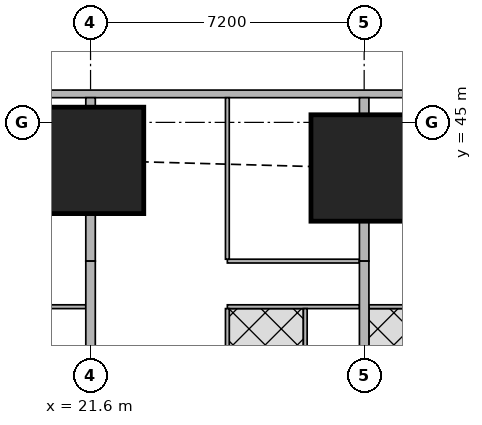
"""IFC4 building model, lengths in metres.
Left out: names, types, materials, properties, quantities, classifications, styles, units other than length and angle.
Written with IfcOpenShell. Run it as: python <this file> out.ifc"""

import sys

from ifc_helpers import new_model, si_unit, direction, frame, frame_2d, origin, origin_2d, place, context, subcontext, project, spatial, rectangle, extrude, element, fill, save


model = new_model("IFC4")
c1 = context("Model", 3, precision=1e-05, world=origin(), true_north=direction((0.0, 1.0)))
c2 = subcontext(c1, "Body", "Model", "MODEL_VIEW")
j1 = project(units=[si_unit("LENGTHUNIT", "METRE"), si_unit("PLANEANGLEUNIT", "RADIAN")], contexts=[c1])
p1 = place(None, origin())
s1 = spatial("IfcSite", under=j1, at=p1, CompositionType="ELEMENT")
p2 = place(p1, origin())
s2 = spatial("IfcBuilding", under=s1, at=p2, CompositionType="ELEMENT")
p3 = place(p2, frame((0.0, 0.0, 42.5)))
s3 = spatial("IfcBuildingStorey", under=s2, at=p3, CompositionType="ELEMENT", Elevation=42.5)
for number, where, z_axis, x_axis in (
    (1, (21.6, 44.0, 0.0), (0.0, 0.0, 1.0), (1.0, 0.0, 0.0)),
    (2, (28.8, 43.8, 0.0), (0.0, 0.0, 1.0), (1.0, 0.0, 0.0)),
):
    element("IfcColumn", number, at=place(p3, frame(where, z_axis=z_axis, x_axis=x_axis)), inside=s3, PredefinedType="COLUMN", context=c2, shape_type="SweptSolid", body=[
        extrude(rectangle(XDim=2.8, YDim=2.8, at=origin_2d()), origin(), (0.0, 0.0, 1.0), 3.75),
    ])
p4 = place(p3, frame((40.106, 45.75, 0.0), z_axis=(0.0, 0.0, 1.0), x_axis=(-1.0, 0.0, 0.0)))
e3 = element("IfcWall", 3, at=p4, inside=s3, PredefinedType="SOLIDWALL", context=c2, shape_type="SweptSolid", body=[
    extrude(rectangle(XDim=37.943, YDim=0.2, at=frame_2d((18.971, 0.0))), origin(), (0.0, 0.0, 1.0), 3.5),
])
p5 = place(p4, frame((8.606, 0.0, 0.9)))
e4 = element("IfcOpeningElement", 4, at=p5, cuts=e3, PredefinedType="OPENING", context=c2, shape_type="SweptSolid", body=[
    extrude(rectangle(XDim=1.8, YDim=1.5, at=frame_2d((0.9, 0.75))), frame((0.0, 0.11, 0.0), z_axis=(0.0, -1.0, 0.0), x_axis=(1.0, 0.0, 0.0)), (0.0, 0.0, 1.0), 0.22),
])
p6 = place(p4, frame((12.206, 0.0, 0.9)))
e5 = element("IfcOpeningElement", 5, at=p6, cuts=e3, PredefinedType="OPENING", context=c2, shape_type="SweptSolid", body=[
    extrude(rectangle(XDim=1.8, YDim=1.5, at=frame_2d((0.9, 0.75))), frame((0.0, 0.11, 0.0), z_axis=(0.0, -1.0, 0.0), x_axis=(1.0, 0.0, 0.0)), (0.0, 0.0, 1.0), 0.22),
])
p7 = place(p4, frame((15.806, 0.0, 0.9)))
e6 = element("IfcOpeningElement", 6, at=p7, cuts=e3, PredefinedType="OPENING", context=c2, shape_type="SweptSolid", body=[
    extrude(rectangle(XDim=1.8, YDim=1.5, at=frame_2d((0.9, 0.75))), frame((0.0, 0.11, 0.0), z_axis=(0.0, -1.0, 0.0), x_axis=(1.0, 0.0, 0.0)), (0.0, 0.0, 1.0), 0.22),
])
p8 = place(p4, frame((19.406, 0.0, 0.9)))
e7 = element("IfcOpeningElement", 7, at=p8, cuts=e3, PredefinedType="OPENING", context=c2, shape_type="SweptSolid", body=[
    extrude(rectangle(XDim=1.8, YDim=1.5, at=frame_2d((0.9, 0.75))), frame((0.0, 0.11, 0.0), z_axis=(0.0, -1.0, 0.0), x_axis=(1.0, 0.0, 0.0)), (0.0, 0.0, 1.0), 0.22),
])
p9 = place(p4, frame((23.006, 0.0, 0.9)))
e8 = element("IfcOpeningElement", 8, at=p9, cuts=e3, PredefinedType="OPENING", context=c2, shape_type="SweptSolid", body=[
    extrude(rectangle(XDim=1.8, YDim=1.5, at=frame_2d((0.9, 0.75))), frame((0.0, 0.11, 0.0), z_axis=(0.0, -1.0, 0.0), x_axis=(1.0, 0.0, 0.0)), (0.0, 0.0, 1.0), 0.22),
])
p10 = place(p4, frame((26.606, 0.0, 0.9)))
e9 = element("IfcOpeningElement", 9, at=p10, cuts=e3, PredefinedType="OPENING", context=c2, shape_type="SweptSolid", body=[
    extrude(rectangle(XDim=1.8, YDim=1.5, at=frame_2d((0.9, 0.75))), frame((0.0, 0.11, 0.0), z_axis=(0.0, -1.0, 0.0), x_axis=(1.0, 0.0, 0.0)), (0.0, 0.0, 1.0), 0.22),
])
p11 = place(p3, frame((18.0, 40.15, 0.0), z_axis=(0.0, 0.0, 1.0), x_axis=(1.0, 0.0, 0.0)))
e10 = element("IfcWall", 10, at=p11, inside=s3, PredefinedType="PARTITIONING", context=c2, shape_type="SweptSolid", body=[
    extrude(rectangle(XDim=3.475, YDim=0.1, at=frame_2d((1.738, 0.0))), origin(), (0.0, 0.0, 1.0), 3.5),
])
p12 = place(p11, frame((0.575, 0.0, 0.0)))
e11 = element("IfcOpeningElement", 11, at=p12, cuts=e10, PredefinedType="OPENING", context=c2, shape_type="SweptSolid", body=[
    extrude(rectangle(XDim=0.9, YDim=2.1, at=frame_2d((0.45, 1.05))), frame((0.0, 0.06, 0.0), z_axis=(0.0, -1.0, 0.0), x_axis=(1.0, 0.0, 0.0)), (0.0, 0.0, 1.0), 0.12),
])
p13 = place(p11, frame((2.375, 0.0, 0.0)))
e12 = element("IfcOpeningElement", 12, at=p13, cuts=e10, PredefinedType="OPENING", context=c2, shape_type="SweptSolid", body=[
    extrude(rectangle(XDim=0.9, YDim=2.1, at=frame_2d((0.45, 1.05))), frame((0.0, 0.06, 0.0), z_axis=(0.0, -1.0, 0.0), x_axis=(1.0, 0.0, 0.0)), (0.0, 0.0, 1.0), 0.12),
])
p14 = place(p3, frame((25.2, 41.35, 0.0), z_axis=(0.0, 0.0, 1.0), x_axis=(1.0, 0.0, 0.0)))
e13 = element("IfcWall", 13, at=p14, inside=s3, PredefinedType="PARTITIONING", context=c2, shape_type="SweptSolid", body=[
    extrude(rectangle(XDim=3.475, YDim=0.1, at=frame_2d((1.738, 0.0))), origin(), (0.0, 0.0, 1.0), 3.5),
])
p15 = place(p14, frame((0.2, 0.0, 0.0)))
e14 = element("IfcOpeningElement", 14, at=p15, cuts=e13, PredefinedType="OPENING", context=c2, shape_type="SweptSolid", body=[
    extrude(rectangle(XDim=0.9, YDim=2.1, at=frame_2d((0.45, 1.05))), frame((0.0, 0.06, 0.0), z_axis=(0.0, -1.0, 0.0), x_axis=(1.0, 0.0, 0.0)), (0.0, 0.0, 1.0), 0.12),
])
p16 = place(p3, frame((25.2, 40.15, 0.0), z_axis=(0.0, 0.0, 1.0), x_axis=(1.0, 0.0, 0.0)))
e15 = element("IfcWall", 15, at=p16, inside=s3, PredefinedType="PARTITIONING", context=c2, shape_type="SweptSolid", body=[
    extrude(rectangle(XDim=3.475, YDim=0.1, at=frame_2d((1.738, 0.0))), origin(), (0.0, 0.0, 1.0), 3.5),
])
p17 = place(p16, frame((0.575, 0.0, 0.0)))
e16 = element("IfcOpeningElement", 16, at=p17, cuts=e15, PredefinedType="OPENING", context=c2, shape_type="SweptSolid", body=[
    extrude(rectangle(XDim=0.9, YDim=2.1, at=frame_2d((0.45, 1.05))), frame((0.0, 0.06, 0.0), z_axis=(0.0, -1.0, 0.0), x_axis=(1.0, 0.0, 0.0)), (0.0, 0.0, 1.0), 0.12),
])
p18 = place(p16, frame((2.375, 0.0, 0.0)))
e17 = element("IfcOpeningElement", 17, at=p18, cuts=e15, PredefinedType="OPENING", context=c2, shape_type="SweptSolid", body=[
    extrude(rectangle(XDim=0.9, YDim=2.1, at=frame_2d((0.45, 1.05))), frame((0.0, 0.06, 0.0), z_axis=(0.0, -1.0, 0.0), x_axis=(1.0, 0.0, 0.0)), (0.0, 0.0, 1.0), 0.12),
])
p19 = place(p3, frame((25.2, 41.4, 0.0), z_axis=(0.0, 0.0, 1.0), x_axis=(0.0, 1.0, 0.0)))
e18 = element("IfcWall", 18, at=p19, inside=s3, PredefinedType="PARTITIONING", context=c2, shape_type="SweptSolid", body=[
    extrude(rectangle(XDim=4.25, YDim=0.1, at=frame_2d((2.125, 0.0))), origin(), (0.0, 0.0, 1.0), 2.05),
])
for number, where, z_axis, x_axis in (
    (19, (25.2, 36.575, 0.0), (0.0, 0.0, 1.0), (0.0, 1.0, 0.0)),
    (20, (27.25, 36.575, 0.0), (0.0, 0.0, 1.0), (0.0, 1.0, 0.0)),
):
    element("IfcWall", number, at=place(p3, frame(where, z_axis=z_axis, x_axis=x_axis)), inside=s3, PredefinedType="PARTITIONING", context=c2, shape_type="SweptSolid", body=[
        extrude(rectangle(XDim=3.525, YDim=0.1, at=frame_2d((1.763, 0.0))), origin(), (0.0, 0.0, 1.0), 3.5),
    ])
p20 = place(p3, frame((21.6, 41.35, 0.0), z_axis=(0.0, 0.0, 1.0), x_axis=(0.0, 1.0, 0.0)))
e21 = element("IfcWall", 21, at=p20, inside=s3, PredefinedType="SOLIDWALL", context=c2, shape_type="SweptSolid", body=[
    extrude(rectangle(XDim=1.249, YDim=0.25, at=frame_2d((0.625, 0.0))), origin(), (0.0, 0.0, 1.0), 3.5),
])
p21 = place(p3, frame((21.6, 45.401, 0.0), z_axis=(0.0, 0.0, 1.0), x_axis=(0.0, 1.0, 0.0)))
e22 = element("IfcWall", 22, at=p21, inside=s3, PredefinedType="SOLIDWALL", context=c2, shape_type="SweptSolid", body=[
    extrude(rectangle(XDim=0.249, YDim=0.25, at=frame_2d((0.125, 0.0))), origin(), (0.0, 0.0, 1.0), 3.5),
])
p22 = place(p3, frame((21.6, 38.401, 0.0), z_axis=(0.0, 0.0, 1.0), x_axis=(0.0, 1.0, 0.0)))
e23 = element("IfcWall", 23, at=p22, inside=s3, PredefinedType="SOLIDWALL", context=c2, shape_type="SweptSolid", body=[
    extrude(rectangle(XDim=2.949, YDim=0.25, at=frame_2d((1.475, 0.0))), origin(), (0.0, 0.0, 1.0), 3.5),
])
p23 = place(p3, frame((28.925, 40.15, 0.0), z_axis=(0.0, 0.0, 1.0), x_axis=(1.0, 0.0, 0.0)))
e24 = element("IfcWall", 24, at=p23, inside=s3, PredefinedType="PARTITIONING", context=c2, shape_type="SweptSolid", body=[
    extrude(rectangle(XDim=1.765, YDim=0.1, at=frame_2d((0.882, 0.0))), origin(), (0.0, 0.0, 1.0), 3.5),
])
p24 = place(p23, frame((0.375, 0.0, 0.0)))
e25 = element("IfcOpeningElement", 25, at=p24, cuts=e24, PredefinedType="OPENING", context=c2, shape_type="SweptSolid", body=[
    extrude(rectangle(XDim=0.9, YDim=2.1, at=frame_2d((0.45, 1.05))), frame((0.0, 0.06, 0.0), z_axis=(0.0, -1.0, 0.0), x_axis=(1.0, 0.0, 0.0)), (0.0, 0.0, 1.0), 0.12),
])
p25 = place(p3, frame((28.8, 41.35, 0.0), z_axis=(0.0, 0.0, 1.0), x_axis=(0.0, 1.0, 0.0)))
e26 = element("IfcWall", 26, at=p25, inside=s3, PredefinedType="SOLIDWALL", context=c2, shape_type="SweptSolid", body=[
    extrude(rectangle(XDim=1.049, YDim=0.25, at=frame_2d((0.524, 0.0))), origin(), (0.0, 0.0, 1.0), 3.5),
])
p26 = place(p3, frame((28.8, 45.201, 0.0), z_axis=(0.0, 0.0, 1.0), x_axis=(0.0, 1.0, 0.0)))
e27 = element("IfcWall", 27, at=p26, inside=s3, PredefinedType="SOLIDWALL", context=c2, shape_type="SweptSolid", body=[
    extrude(rectangle(XDim=0.449, YDim=0.25, at=frame_2d((0.225, 0.0))), origin(), (0.0, 0.0, 1.0), 3.5),
])
p27 = place(p3, frame((28.8, 38.401, 0.0), z_axis=(0.0, 0.0, 1.0), x_axis=(0.0, 1.0, 0.0)))
e28 = element("IfcWall", 28, at=p27, inside=s3, PredefinedType="SOLIDWALL", context=c2, shape_type="SweptSolid", body=[
    extrude(rectangle(XDim=2.949, YDim=0.25, at=frame_2d((1.475, 0.0))), origin(), (0.0, 0.0, 1.0), 3.5),
])
p28 = place(p5, origin())
e29 = element("IfcWindow", 29, at=p28, inside=s3, PartitioningType="SINGLE_PANEL", PredefinedType="WINDOW", context=c2, shape_type="SweptSolid", body=[
    extrude(rectangle(XDim=1.8, YDim=1.5, at=frame_2d((0.9, 0.75))), frame((0.0, 0.03, 0.0), z_axis=(0.0, -1.0, 0.0), x_axis=(1.0, 0.0, 0.0)), (0.0, 0.0, 1.0), 0.06),
])
fill(e4, e29)
p29 = place(p6, origin())
e30 = element("IfcWindow", 30, at=p29, inside=s3, PartitioningType="SINGLE_PANEL", PredefinedType="WINDOW", context=c2, shape_type="SweptSolid", body=[
    extrude(rectangle(XDim=1.8, YDim=1.5, at=frame_2d((0.9, 0.75))), frame((0.0, 0.03, 0.0), z_axis=(0.0, -1.0, 0.0), x_axis=(1.0, 0.0, 0.0)), (0.0, 0.0, 1.0), 0.06),
])
fill(e5, e30)
p30 = place(p7, origin())
e31 = element("IfcWindow", 31, at=p30, inside=s3, PartitioningType="SINGLE_PANEL", PredefinedType="WINDOW", context=c2, shape_type="SweptSolid", body=[
    extrude(rectangle(XDim=1.8, YDim=1.5, at=frame_2d((0.9, 0.75))), frame((0.0, 0.03, 0.0), z_axis=(0.0, -1.0, 0.0), x_axis=(1.0, 0.0, 0.0)), (0.0, 0.0, 1.0), 0.06),
])
fill(e6, e31)
p31 = place(p8, origin())
e32 = element("IfcWindow", 32, at=p31, inside=s3, PartitioningType="SINGLE_PANEL", PredefinedType="WINDOW", context=c2, shape_type="SweptSolid", body=[
    extrude(rectangle(XDim=1.8, YDim=1.5, at=frame_2d((0.9, 0.75))), frame((0.0, 0.03, 0.0), z_axis=(0.0, -1.0, 0.0), x_axis=(1.0, 0.0, 0.0)), (0.0, 0.0, 1.0), 0.06),
])
fill(e7, e32)
p32 = place(p13, origin())
e33 = element("IfcDoor", 33, at=p32, inside=s3, OperationType="SINGLE_SWING_LEFT", PredefinedType="DOOR", context=c2, shape_type="SweptSolid", body=[
    extrude(rectangle(XDim=0.9, YDim=2.1, at=frame_2d((0.45, 1.05))), frame((0.0, 0.025, 0.0), z_axis=(0.0, -1.0, 0.0), x_axis=(1.0, 0.0, 0.0)), (0.0, 0.0, 1.0), 0.05),
])
fill(e12, e33)
p33 = place(p15, origin())
e34 = element("IfcDoor", 34, at=p33, inside=s3, OperationType="SINGLE_SWING_LEFT", PredefinedType="DOOR", context=c2, shape_type="SweptSolid", body=[
    extrude(rectangle(XDim=0.9, YDim=2.1, at=frame_2d((0.45, 1.05))), frame((0.0, 0.025, 0.0), z_axis=(0.0, -1.0, 0.0), x_axis=(1.0, 0.0, 0.0)), (0.0, 0.0, 1.0), 0.05),
])
fill(e14, e34)
p34 = place(p17, origin())
e35 = element("IfcDoor", 35, at=p34, inside=s3, OperationType="SINGLE_SWING_RIGHT", PredefinedType="DOOR", context=c2, shape_type="SweptSolid", body=[
    extrude(rectangle(XDim=0.9, YDim=2.1, at=frame_2d((0.45, 1.05))), frame((0.0, 0.025, 0.0), z_axis=(0.0, -1.0, 0.0), x_axis=(1.0, 0.0, 0.0)), (0.0, 0.0, 1.0), 0.05),
])
fill(e16, e35)
p35 = place(p18, origin())
e36 = element("IfcDoor", 36, at=p35, inside=s3, OperationType="SINGLE_SWING_LEFT", PredefinedType="DOOR", context=c2, shape_type="SweptSolid", body=[
    extrude(rectangle(XDim=0.9, YDim=2.1, at=frame_2d((0.45, 1.05))), frame((0.0, 0.025, 0.0), z_axis=(0.0, -1.0, 0.0), x_axis=(1.0, 0.0, 0.0)), (0.0, 0.0, 1.0), 0.05),
])
fill(e17, e36)
p36 = place(p24, origin())
e37 = element("IfcDoor", 37, at=p36, inside=s3, OperationType="SINGLE_SWING_RIGHT", PredefinedType="DOOR", context=c2, shape_type="SweptSolid", body=[
    extrude(rectangle(XDim=0.9, YDim=2.1, at=frame_2d((0.45, 1.05))), frame((0.0, 0.025, 0.0), z_axis=(0.0, -1.0, 0.0), x_axis=(1.0, 0.0, 0.0)), (0.0, 0.0, 1.0), 0.05),
])
fill(e25, e37)
save(model, sys.argv[1])
